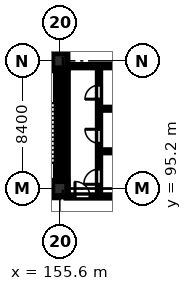
"""IFC4 building model, lengths in metres.
Left out: names, types, materials, properties, quantities, classifications, styles, units other than length and angle.
Written with IfcOpenShell. Run it as: python <this file> out.ifc"""

import sys

from ifc_helpers import new_model, si_unit, direction, frame, frame_2d, origin, origin_2d, place, context, subcontext, project, spatial, rectangle, extrude, element, fill, save


model = new_model("IFC4")
c1 = context("Model", 3, precision=1e-05, world=origin(), true_north=direction((0.0, 1.0)))
c2 = subcontext(c1, "Body", "Model", "MODEL_VIEW")
j1 = project(units=[si_unit("LENGTHUNIT", "METRE"), si_unit("PLANEANGLEUNIT", "RADIAN")], contexts=[c1])
p1 = place(None, origin())
s1 = spatial("IfcSite", under=j1, at=p1, CompositionType="ELEMENT")
p2 = place(p1, origin())
s2 = spatial("IfcBuilding", under=s1, at=p2, CompositionType="ELEMENT")
p3 = place(p2, frame((0.0, 0.0, 5.4)))
s3 = spatial("IfcBuildingStorey", under=s2, at=p3, CompositionType="ELEMENT", Elevation=5.4)
for number, where, z_axis, x_axis in (
    (1, (155.6, 95.2, 0.0), (0.0, 0.0, 1.0), (1.0, 0.0, 0.0)),
    (2, (155.6, 103.6, 0.0), (0.0, 0.0, 1.0), (1.0, 0.0, 0.0)),
):
    element("IfcColumn", number, at=place(p3, frame(where, z_axis=z_axis, x_axis=x_axis)), inside=s3, PredefinedType="COLUMN", context=c2, shape_type="SweptSolid", body=[
        extrude(rectangle(XDim=1.0, YDim=1.0, at=origin_2d()), origin(), (0.0, 0.0, 1.0), 4.58),
    ])
for number, where, z_axis, x_axis in (
    (3, (151.85, 95.25, 0.0), (0.0, 0.0, 1.0), (1.0, 0.0, 0.0)),
    (4, (151.85, 103.55, 0.0), (0.0, 0.0, 1.0), (1.0, 0.0, 0.0)),
):
    element("IfcWall", number, at=place(p3, frame(where, z_axis=z_axis, x_axis=x_axis)), inside=s3, PredefinedType="SHEAR", context=c2, shape_type="SweptSolid", body=[
        extrude(rectangle(XDim=3.9, YDim=0.4, at=frame_2d((1.95, 0.0))), origin(), (0.0, 0.0, 1.0), 4.58),
    ])
p4 = place(p3, frame((155.55, 95.45, 0.0), z_axis=(0.0, 0.0, 1.0), x_axis=(0.0, 1.0, 0.0)))
e5 = element("IfcWall", 5, at=p4, inside=s3, PredefinedType="SHEAR", context=c2, shape_type="SweptSolid", body=[
    extrude(rectangle(XDim=7.9, YDim=0.4, at=frame_2d((3.95, 0.0))), origin(), (0.0, 0.0, 1.0), 4.58),
])
p5 = place(p3, frame((156.05, 94.68, 0.0), z_axis=(0.0, 0.0, 1.0), x_axis=(1.0, 0.0, 0.0)))
e6 = element("IfcWall", 6, at=p5, inside=s3, PredefinedType="PARTITIONING", context=c2, shape_type="SweptSolid", body=[
    extrude(rectangle(XDim=7.15, YDim=0.15, at=frame_2d((3.575, 0.0))), origin(), (0.0, 0.0, 1.0), 4.58),
])
p6 = place(p5, frame((0.55, 0.0, 0.0)))
e7 = element("IfcOpeningElement", 7, at=p6, cuts=e6, PredefinedType="OPENING", context=c2, shape_type="SweptSolid", body=[
    extrude(rectangle(XDim=0.98, YDim=2.12, at=frame_2d((0.49, 1.06))), frame((0.0, 0.085, 0.0), z_axis=(0.0, -1.0, 0.0), x_axis=(1.0, 0.0, 0.0)), (0.0, 0.0, 1.0), 0.17),
])
p7 = place(p3, frame((158.18, 94.68, 0.0), z_axis=(0.0, 0.0, 1.0), x_axis=(0.0, 1.0, 0.0)))
e8 = element("IfcWall", 8, at=p7, inside=s3, PredefinedType="PARTITIONING", context=c2, shape_type="SweptSolid", body=[
    extrude(rectangle(XDim=8.57, YDim=0.15, at=frame_2d((4.285, 0.0))), origin(), (0.0, 0.0, 1.0), 4.58),
])
p8 = place(p7, frame((0.8, 0.0, 0.0)))
e9 = element("IfcOpeningElement", 9, at=p8, cuts=e8, PredefinedType="OPENING", context=c2, shape_type="SweptSolid", body=[
    extrude(rectangle(XDim=1.0, YDim=2.12, at=frame_2d((0.5, 1.06))), frame((0.0, 0.085, 0.0), z_axis=(0.0, -1.0, 0.0), x_axis=(1.0, 0.0, 0.0)), (0.0, 0.0, 1.0), 0.17),
])
p9 = place(p7, frame((3.5, 0.0, 0.0)))
e10 = element("IfcOpeningElement", 10, at=p9, cuts=e8, PredefinedType="OPENING", context=c2, shape_type="SweptSolid", body=[
    extrude(rectangle(XDim=0.92, YDim=2.1, at=frame_2d((0.46, 1.05))), frame((0.0, 0.085, 0.0), z_axis=(0.0, -1.0, 0.0), x_axis=(1.0, 0.0, 0.0)), (0.0, 0.0, 1.0), 0.17),
])
p10 = place(p7, frame((6.4, 0.0, 0.0)))
e11 = element("IfcOpeningElement", 11, at=p10, cuts=e8, PredefinedType="OPENING", context=c2, shape_type="SweptSolid", body=[
    extrude(rectangle(XDim=0.92, YDim=2.1, at=frame_2d((0.46, 1.05))), frame((0.0, 0.085, 0.0), z_axis=(0.0, -1.0, 0.0), x_axis=(1.0, 0.0, 0.0)), (0.0, 0.0, 1.0), 0.17),
])
for number, where, z_axis, x_axis in (
    (12, (158.18, 97.65, 0.0), (0.0, 0.0, 1.0), (1.0, 0.0, 0.0)),
    (13, (158.18, 100.45, 0.0), (0.0, 0.0, 1.0), (1.0, 0.0, 0.0)),
):
    element("IfcWall", number, at=place(p3, frame(where, z_axis=z_axis, x_axis=x_axis)), inside=s3, PredefinedType="PARTITIONING", context=c2, shape_type="SweptSolid", body=[
        extrude(rectangle(XDim=5.02, YDim=0.135, at=frame_2d((2.51, 0.0))), origin(), (0.0, 0.0, 1.0), 4.58),
    ])
p11 = place(p3, frame((156.05, 103.25, 0.0), z_axis=(0.0, 0.0, 1.0), x_axis=(1.0, 0.0, 0.0)))
e14 = element("IfcWall", 14, at=p11, inside=s3, PredefinedType="PARTITIONING", context=c2, shape_type="SweptSolid", body=[
    extrude(rectangle(XDim=7.15, YDim=0.15, at=frame_2d((3.575, 0.0))), origin(), (0.0, 0.0, 1.0), 4.58),
])
p12 = place(p3, frame((156.05, 94.68, 0.0), z_axis=(0.0, 0.0, 1.0), x_axis=(0.0, 1.0, 0.0)))
e15 = element("IfcWall", 15, at=p12, inside=s3, PredefinedType="PARTITIONING", context=c2, shape_type="SweptSolid", body=[
    extrude(rectangle(XDim=8.57, YDim=0.15, at=frame_2d((4.285, 0.0))), origin(), (0.0, 0.0, 1.0), 4.58),
])
p13 = place(p6, origin())
e16 = element("IfcDoor", 16, at=p13, inside=s3, OperationType="SINGLE_SWING_LEFT", PredefinedType="DOOR", context=c2, shape_type="SweptSolid", body=[
    extrude(rectangle(XDim=0.98, YDim=2.12, at=frame_2d((0.49, 1.06))), frame((0.0, 0.025, 0.0), z_axis=(0.0, -1.0, 0.0), x_axis=(1.0, 0.0, 0.0)), (0.0, 0.0, 1.0), 0.05),
])
fill(e7, e16)
p14 = place(p8, origin())
e17 = element("IfcDoor", 17, at=p14, inside=s3, OperationType="SINGLE_SWING_LEFT", PredefinedType="DOOR", context=c2, shape_type="SweptSolid", body=[
    extrude(rectangle(XDim=1.0, YDim=2.12, at=frame_2d((0.5, 1.06))), frame((0.0, 0.025, 0.0), z_axis=(0.0, -1.0, 0.0), x_axis=(1.0, 0.0, 0.0)), (0.0, 0.0, 1.0), 0.05),
])
fill(e9, e17)
p15 = place(p9, origin())
e18 = element("IfcDoor", 18, at=p15, inside=s3, OperationType="SINGLE_SWING_RIGHT", PredefinedType="DOOR", context=c2, shape_type="SweptSolid", body=[
    extrude(rectangle(XDim=0.92, YDim=2.1, at=frame_2d((0.46, 1.05))), frame((0.0, 0.025, 0.0), z_axis=(0.0, -1.0, 0.0), x_axis=(1.0, 0.0, 0.0)), (0.0, 0.0, 1.0), 0.05),
])
fill(e10, e18)
p16 = place(p10, origin())
e19 = element("IfcDoor", 19, at=p16, inside=s3, OperationType="SINGLE_SWING_LEFT", PredefinedType="DOOR", context=c2, shape_type="SweptSolid", body=[
    extrude(rectangle(XDim=0.92, YDim=2.1, at=frame_2d((0.46, 1.05))), frame((0.0, 0.025, 0.0), z_axis=(0.0, -1.0, 0.0), x_axis=(1.0, 0.0, 0.0)), (0.0, 0.0, 1.0), 0.05),
])
fill(e11, e19)
save(model, sys.argv[1])
